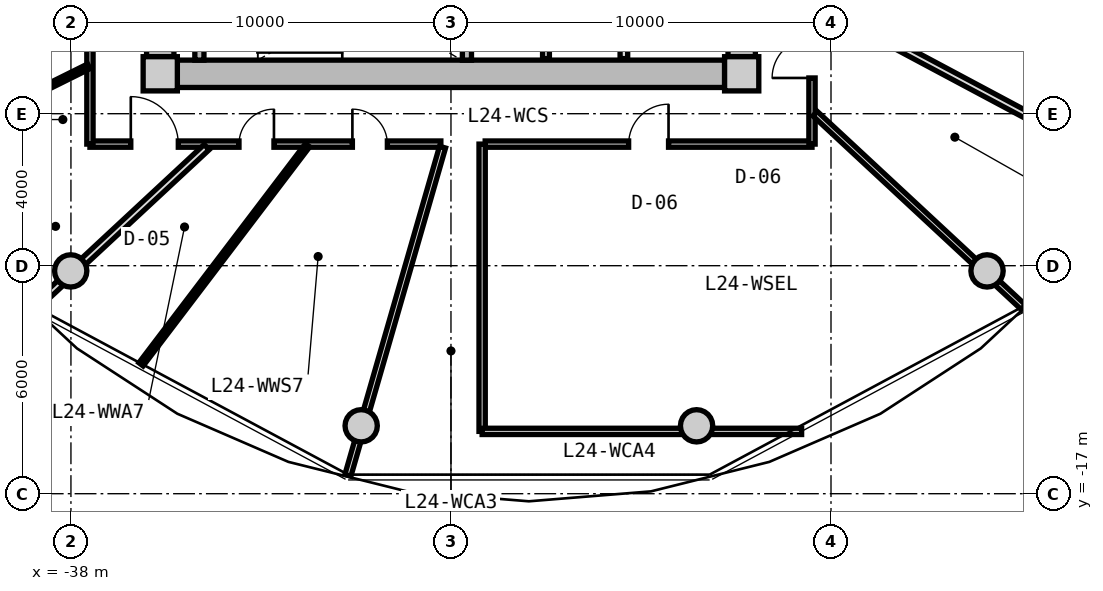
"""IFC4 building model, lengths in metres.
Left out: names, types, materials, properties, quantities, classifications, styles, units other than length and angle.
Written with IfcOpenShell. Run it as: python <this file> out.ifc"""

import sys

from ifc_helpers import new_model, si_unit, direction, frame, frame_2d, origin, origin_2d, place, context, subcontext, project, spatial, rectangle, circle, extrude, source, transform, mapped, element, fill, save


model = new_model("IFC4")
c1 = context("Model", 3, precision=1e-05, world=origin(), true_north=direction((0.0, 1.0)))
c2 = subcontext(c1, "Body", "Model", "MODEL_VIEW")
j1 = project(units=[si_unit("LENGTHUNIT", "METRE"), si_unit("PLANEANGLEUNIT", "RADIAN")], contexts=[c1])
p1 = place(None, origin())
s1 = spatial("IfcSite", under=j1, at=p1, CompositionType="ELEMENT")
p2 = place(p1, origin())
s2 = spatial("IfcBuilding", under=s1, at=p2, CompositionType="ELEMENT")
p3 = place(p2, frame((0.0, 0.0, 81.0)))
s3 = spatial("IfcBuildingStorey", under=s2, at=p3, CompositionType="ELEMENT", Elevation=81.0)
m1 = source(origin(), c2, "Body", "SweptSolid", [
    extrude(rectangle(XDim=0.9, YDim=0.9, at=origin_2d()), origin(), (0.0, 0.0, 1.0), 3.05),
])
for number, where, z_axis, x_axis in (
    (1, (-35.65, -5.95, 0.0), (0.0, 0.0, 1.0), (1.0, 0.0, 0.0)),
    (2, (-20.35, -5.95, 0.0), (0.0, 0.0, 1.0), (1.0, 0.0, 0.0)),
):
    element("IfcColumn", number, at=place(p3, frame(where, z_axis=z_axis, x_axis=x_axis)), inside=s3, PredefinedType="COLUMN", context=c2, shape_type="MappedRepresentation", body=[
        mapped(m1, transform((0.0, 0.0, 0.0), x_axis=(1.0, 0.0, 0.0), y_axis=(0.0, 1.0, 0.0), z_axis=(0.0, 0.0, 1.0), scale=1.0)),
    ])
m2 = source(origin(), c2, "Body", "SweptSolid", [
    extrude(rectangle(XDim=14.4, YDim=0.72, at=frame_2d((7.2, 0.0))), origin(), (0.0, 0.0, 1.0), 2.79),
])
p4 = place(p3, frame((-20.8, -5.95, 0.0), z_axis=(0.0, 0.0, 1.0), x_axis=(-1.0, 0.0, 0.0)))
e3 = element("IfcWall", 3, at=p4, inside=s3, PredefinedType="SHEAR", context=c2, shape_type="MappedRepresentation", body=[
    mapped(m2, transform((0.0, 0.0, 0.0), x_axis=(1.0, 0.0, 0.0), y_axis=(0.0, 1.0, 0.0), z_axis=(0.0, 0.0, 1.0), scale=1.0)),
])
m3 = source(origin(), c2, "Body", "SweptSolid", [
    extrude(rectangle(XDim=11.0, YDim=0.72, at=frame_2d((5.5, 0.0))), origin(), (0.0, 0.0, 1.0), 2.79),
])
p5 = place(p3, frame((-35.65, -5.5, 0.0), z_axis=(0.0, 0.0, 1.0), x_axis=(0.0, 1.0, 0.0)))
e4 = element("IfcWall", 4, at=p5, inside=s3, PredefinedType="SHEAR", context=c2, shape_type="MappedRepresentation", body=[
    mapped(m3, transform((0.0, 0.0, 0.0), x_axis=(1.0, 0.0, 0.0), y_axis=(0.0, 1.0, 0.0), z_axis=(0.0, 0.0, 1.0), scale=1.0)),
])
p6 = place(p5, frame((3.8, 0.0, 0.0)))
e5 = element("IfcOpeningElement", 5, at=p6, cuts=e4, PredefinedType="OPENING", context=c2, shape_type="SweptSolid", body=[
    extrude(rectangle(XDim=1.2, YDim=2.15, at=frame_2d((0.6, 1.075))), frame((0.0, 0.37, 0.0), z_axis=(0.0, -1.0, 0.0), x_axis=(1.0, 0.0, 0.0)), (0.0, 0.0, 1.0), 0.74),
])
p7 = place(p3, frame((-20.35, 5.5, 0.0), z_axis=(0.0, 0.0, 1.0), x_axis=(0.0, -1.0, 0.0)))
e6 = element("IfcWall", 6, at=p7, inside=s3, PredefinedType="SHEAR", context=c2, shape_type="MappedRepresentation", body=[
    mapped(m3, transform((0.0, 0.0, 0.0), x_axis=(1.0, 0.0, 0.0), y_axis=(0.0, 1.0, 0.0), z_axis=(0.0, 0.0, 1.0), scale=1.0)),
])
p8 = place(p7, frame((5.65, 0.0, 0.0)))
e7 = element("IfcOpeningElement", 7, at=p8, cuts=e6, PredefinedType="OPENING", context=c2, shape_type="SweptSolid", body=[
    extrude(rectangle(XDim=1.2, YDim=2.15, at=frame_2d((0.6, 1.075))), frame((0.0, 0.37, 0.0), z_axis=(0.0, -1.0, 0.0), x_axis=(1.0, 0.0, 0.0)), (0.0, 0.0, 1.0), 0.74),
])
m4 = source(origin(), c2, "Body", "SweptSolid", [
    extrude(circle(Radius=0.425, at=origin_2d()), origin(), (0.0, 0.0, 1.0), 3.05),
])
for number, where, z_axis, x_axis in (
    (8, (-38.006, -11.137, 0.0), (0.0, 0.0, 1.0), (1.0, 0.0, 0.0)),
    (9, (-30.363, -15.213, 0.0), (0.0, 0.0, 1.0), (1.0, 0.0, 0.0)),
    (10, (-21.537, -15.213, 0.0), (0.0, 0.0, 1.0), (1.0, 0.0, 0.0)),
    (11, (-13.894, -11.137, 0.0), (0.0, 0.0, 1.0), (1.0, 0.0, 0.0)),
):
    element("IfcColumn", number, at=place(p3, frame(where, z_axis=z_axis, x_axis=x_axis)), inside=s3, PredefinedType="COLUMN", context=c2, shape_type="MappedRepresentation", body=[
        mapped(m4, transform((0.0, 0.0, 0.0), x_axis=(1.0, 0.0, 0.0), y_axis=(0.0, 1.0, 0.0), z_axis=(0.0, 0.0, 1.0), scale=1.0)),
    ])
m5 = source(origin(), c2, "Body", "SweptSolid", [
    extrude(rectangle(XDim=3.14, YDim=0.24, at=frame_2d((1.57, 0.0))), origin(), (0.0, 0.0, 1.0), 2.79),
])
for number, where, z_axis, x_axis in (
    (12, (-34.62, -5.59, 0.0), (0.0, 0.0, 1.0), (0.0, 1.0, 0.0)),
    (13, (-27.58, -5.59, 0.0), (0.0, 0.0, 1.0), (0.0, 1.0, 0.0)),
):
    element("IfcWall", number, at=place(p3, frame(where, z_axis=z_axis, x_axis=x_axis)), inside=s3, PredefinedType="PARTITIONING", context=c2, shape_type="MappedRepresentation", body=[
        mapped(m5, transform((0.0, 0.0, 0.0), x_axis=(1.0, 0.0, 0.0), y_axis=(0.0, 1.0, 0.0), z_axis=(0.0, 0.0, 1.0), scale=1.0)),
    ])
m6 = source(origin(), c2, "Body", "SweptSolid", [
    extrude(rectangle(XDim=3.8, YDim=0.2, at=frame_2d((1.9, 0.0))), origin(), (0.0, 0.0, 1.0), 2.775),
])
p9 = place(p3, frame((-23.45, -5.55, 0.0), z_axis=(0.0, 0.0, 1.0), x_axis=(0.0, 1.0, 0.0)))
e14 = element("IfcWall", 14, at=p9, inside=s3, PredefinedType="PARTITIONING", context=c2, shape_type="MappedRepresentation", body=[
    mapped(m6, transform((0.0, 0.0, 0.0), x_axis=(1.0, 0.0, 0.0), y_axis=(0.0, 1.0, 0.0), z_axis=(0.0, 0.0, 1.0), scale=1.0)),
])
m7 = source(origin(), c2, "Body", "SweptSolid", [
    extrude(rectangle(XDim=3.22, YDim=0.18, at=frame_2d((1.61, 0.0))), origin(), (0.0, 0.0, 1.0), 2.775),
])
p10 = place(p3, frame((-25.5, -5.55, 0.0), z_axis=(0.0, 0.0, 1.0), x_axis=(0.0, 1.0, 0.0)))
e15 = element("IfcWall", 15, at=p10, inside=s3, PredefinedType="PARTITIONING", context=c2, shape_type="MappedRepresentation", body=[
    mapped(m7, transform((0.0, 0.0, 0.0), x_axis=(1.0, 0.0, 0.0), y_axis=(0.0, 1.0, 0.0), z_axis=(0.0, 0.0, 1.0), scale=1.0)),
])
m8 = source(origin(), c2, "Body", "SweptSolid", [
    extrude(rectangle(XDim=8.6, YDim=0.165, at=frame_2d((4.3, 0.0))), origin(), (0.0, 0.0, 1.0), 2.775),
])
p11 = place(p3, frame((-18.5, -7.8, 0.0), z_axis=(0.0, 0.0, 1.0), x_axis=(-1.0, 0.0, 0.0)))
e16 = element("IfcWall", 16, at=p11, inside=s3, PredefinedType="PARTITIONING", context=c2, shape_type="MappedRepresentation", body=[
    mapped(m8, transform((0.0, 0.0, 0.0), x_axis=(1.0, 0.0, 0.0), y_axis=(0.0, 1.0, 0.0), z_axis=(0.0, 0.0, 1.0), scale=1.0)),
])
p12 = place(p11, frame((3.775, 0.0, 0.0)))
e17 = element("IfcOpeningElement", 17, at=p12, cuts=e16, PredefinedType="OPENING", context=c2, shape_type="SweptSolid", body=[
    extrude(rectangle(XDim=1.05, YDim=2.15, at=frame_2d((0.525, 1.075))), frame((0.0, 0.093, 0.0), z_axis=(0.0, -1.0, 0.0), x_axis=(1.0, 0.0, 0.0)), (0.0, 0.0, 1.0), 0.185),
])
m9 = source(origin(), c2, "Body", "SweptSolid", [
    extrude(rectangle(XDim=9.234, YDim=0.165, at=frame_2d((4.617, 0.0))), origin(), (0.0, 0.0, 1.0), 2.775),
])
p13 = place(p3, frame((-28.266, -7.8, 0.0), z_axis=(0.0, 0.0, 1.0), x_axis=(-1.0, 0.0, 0.0)))
e18 = element("IfcWall", 18, at=p13, inside=s3, PredefinedType="PARTITIONING", context=c2, shape_type="MappedRepresentation", body=[
    mapped(m9, transform((0.0, 0.0, 0.0), x_axis=(1.0, 0.0, 0.0), y_axis=(0.0, 1.0, 0.0), z_axis=(0.0, 0.0, 1.0), scale=1.0)),
])
p14 = place(p13, frame((6.909, 0.0, 0.0)))
e19 = element("IfcOpeningElement", 19, at=p14, cuts=e18, PredefinedType="OPENING", context=c2, shape_type="SweptSolid", body=[
    extrude(rectangle(XDim=1.25, YDim=2.2, at=frame_2d((0.625, 1.1))), frame((0.0, 0.093, 0.0), z_axis=(0.0, -1.0, 0.0), x_axis=(1.0, 0.0, 0.0)), (0.0, 0.0, 1.0), 0.185),
])
p15 = place(p13, frame((4.392, 0.0, 0.0)))
e20 = element("IfcOpeningElement", 20, at=p15, cuts=e18, PredefinedType="OPENING", context=c2, shape_type="SweptSolid", body=[
    extrude(rectangle(XDim=0.92, YDim=2.1, at=frame_2d((0.46, 1.05))), frame((0.0, 0.093, 0.0), z_axis=(0.0, -1.0, 0.0), x_axis=(1.0, 0.0, 0.0)), (0.0, 0.0, 1.0), 0.185),
])
p16 = place(p13, frame((1.408, 0.0, 0.0)))
e21 = element("IfcOpeningElement", 21, at=p16, cuts=e18, PredefinedType="OPENING", context=c2, shape_type="SweptSolid", body=[
    extrude(rectangle(XDim=0.92, YDim=2.1, at=frame_2d((0.46, 1.05))), frame((0.0, 0.093, 0.0), z_axis=(0.0, -1.0, 0.0), x_axis=(1.0, 0.0, 0.0)), (0.0, 0.0, 1.0), 0.185),
])
m10 = source(origin(), c2, "Body", "SweptSolid", [
    extrude(rectangle(XDim=15.6, YDim=0.165, at=frame_2d((7.8, 0.0))), origin(), (0.0, 0.0, 1.0), 2.775),
])
p17 = place(p3, frame((-37.5, -7.8, 0.0), z_axis=(0.0, 0.0, 1.0), x_axis=(0.0, 1.0, 0.0)))
e22 = element("IfcWall", 22, at=p17, inside=s3, PredefinedType="PARTITIONING", context=c2, shape_type="MappedRepresentation", body=[
    mapped(m10, transform((0.0, 0.0, 0.0), x_axis=(1.0, 0.0, 0.0), y_axis=(0.0, 1.0, 0.0), z_axis=(0.0, 0.0, 1.0), scale=1.0)),
])
p18 = place(p17, frame((12.399, 0.0, 0.0)))
e23 = element("IfcOpeningElement", 23, at=p18, cuts=e22, PredefinedType="OPENING", context=c2, shape_type="SweptSolid", body=[
    extrude(rectangle(XDim=1.25, YDim=2.2, at=frame_2d((0.625, 1.1))), frame((0.0, 0.093, 0.0), z_axis=(0.0, -1.0, 0.0), x_axis=(1.0, 0.0, 0.0)), (0.0, 0.0, 1.0), 0.185),
])
p19 = place(p17, frame((7.175, 0.0, 0.0)))
e24 = element("IfcOpeningElement", 24, at=p19, cuts=e22, PredefinedType="OPENING", context=c2, shape_type="SweptSolid", body=[
    extrude(rectangle(XDim=1.25, YDim=2.2, at=frame_2d((0.625, 1.1))), frame((0.0, 0.093, 0.0), z_axis=(0.0, -1.0, 0.0), x_axis=(1.0, 0.0, 0.0)), (0.0, 0.0, 1.0), 0.185),
])
p20 = place(p3, frame((-18.5, 7.8, 0.0), z_axis=(0.0, 0.0, 1.0), x_axis=(0.0, -1.0, 0.0)))
e25 = element("IfcWall", 25, at=p20, inside=s3, PredefinedType="PARTITIONING", context=c2, shape_type="MappedRepresentation", body=[
    mapped(m10, transform((0.0, 0.0, 0.0), x_axis=(1.0, 0.0, 0.0), y_axis=(0.0, 1.0, 0.0), z_axis=(0.0, 0.0, 1.0), scale=1.0)),
])
p21 = place(p20, frame((12.81, 0.0, 0.0)))
e26 = element("IfcOpeningElement", 26, at=p21, cuts=e25, PredefinedType="OPENING", context=c2, shape_type="SweptSolid", body=[
    extrude(rectangle(XDim=1.05, YDim=2.15, at=frame_2d((0.525, 1.075))), frame((0.0, 0.093, 0.0), z_axis=(0.0, -1.0, 0.0), x_axis=(1.0, 0.0, 0.0)), (0.0, 0.0, 1.0), 0.185),
])
p22 = place(p20, frame((10.21, 0.0, 0.0)))
e27 = element("IfcOpeningElement", 27, at=p22, cuts=e25, PredefinedType="OPENING", context=c2, shape_type="SweptSolid", body=[
    extrude(rectangle(XDim=1.05, YDim=2.15, at=frame_2d((0.525, 1.075))), frame((0.0, 0.093, 0.0), z_axis=(0.0, -1.0, 0.0), x_axis=(1.0, 0.0, 0.0)), (0.0, 0.0, 1.0), 0.185),
])
p23 = place(p20, frame((4.575, 0.0, 0.0)))
e28 = element("IfcOpeningElement", 28, at=p23, cuts=e25, PredefinedType="OPENING", context=c2, shape_type="SweptSolid", body=[
    extrude(rectangle(XDim=1.25, YDim=2.2, at=frame_2d((0.625, 1.1))), frame((0.0, 0.093, 0.0), z_axis=(0.0, -1.0, 0.0), x_axis=(1.0, 0.0, 0.0)), (0.0, 0.0, 1.0), 0.185),
])
m11 = source(origin(), c2, "Body", "SweptSolid", [
    extrude(rectangle(XDim=8.989, YDim=0.165, at=frame_2d((4.495, 0.0))), origin(), (0.0, 0.0, 1.0), 2.275),
])
p24 = place(p3, frame((-28.222, -7.88, 0.0), z_axis=(0.0, 0.0, 1.0), x_axis=(-0.27702323008, -0.960863221274, 0.0)))
e29 = element("IfcWall", 29, at=p24, inside=s3, PredefinedType="PARTITIONING", context=c2, shape_type="MappedRepresentation", body=[
    mapped(m11, transform((0.0, 0.0, 0.0), x_axis=(1.0, 0.0, 0.0), y_axis=(0.0, 1.0, 0.0), z_axis=(0.0, 0.0, 1.0), scale=1.0)),
])
m12 = source(origin(), c2, "Body", "SweptSolid", [
    extrude(rectangle(XDim=7.482, YDim=0.165, at=frame_2d((3.741, 0.0))), origin(), (0.0, 0.0, 1.0), 2.275),
])
p25 = place(p3, frame((-18.42, -6.998, 0.0), z_axis=(0.0, 0.0, 1.0), x_axis=(0.732508698043, -0.680757671489, 0.0)))
e30 = element("IfcWall", 30, at=p25, inside=s3, PredefinedType="PARTITIONING", context=c2, shape_type="MappedRepresentation", body=[
    mapped(m12, transform((0.0, 0.0, 0.0), x_axis=(1.0, 0.0, 0.0), y_axis=(0.0, 1.0, 0.0), z_axis=(0.0, 0.0, 1.0), scale=1.0)),
])
m13 = source(origin(), c2, "Body", "SweptSolid", [
    extrude(rectangle(XDim=7.56, YDim=0.165, at=frame_2d((3.78, 0.0))), origin(), (0.0, 0.0, 1.0), 2.775),
])
p26 = place(p3, frame((-27.18, -15.36, 0.0), z_axis=(0.0, 0.0, 1.0), x_axis=(0.0, 1.0, 0.0)))
e31 = element("IfcWall", 31, at=p26, inside=s3, PredefinedType="PARTITIONING", context=c2, shape_type="MappedRepresentation", body=[
    mapped(m13, transform((0.0, 0.0, 0.0), x_axis=(1.0, 0.0, 0.0), y_axis=(0.0, 1.0, 0.0), z_axis=(0.0, 0.0, 1.0), scale=1.0)),
])
m14 = source(origin(), c2, "Body", "SweptSolid", [
    extrude(rectangle(XDim=8.407, YDim=0.165, at=frame_2d((4.204, 0.0))), origin(), (0.0, 0.0, 1.0), 2.275),
])
p27 = place(p3, frame((-27.18, -15.36, 0.0), z_axis=(0.0, 0.0, 1.0), x_axis=(1.0, 0.0, 0.0)))
e32 = element("IfcWall", 32, at=p27, inside=s3, PredefinedType="PARTITIONING", context=c2, shape_type="MappedRepresentation", body=[
    mapped(m14, transform((0.0, 0.0, 0.0), x_axis=(1.0, 0.0, 0.0), y_axis=(0.0, 1.0, 0.0), z_axis=(0.0, 0.0, 1.0), scale=1.0)),
])
m15 = source(origin(), c2, "Body", "SweptSolid", [
    extrude(rectangle(XDim=6.187, YDim=0.19, at=frame_2d((3.093, 0.0))), origin(), (0.0, 0.0, 1.0), 2.275),
])
p28 = place(p3, frame((-34.429, -7.88, 0.0), z_axis=(0.0, 0.0, 1.0), x_axis=(-0.732501077882, -0.680765870841, 0.0)))
e33 = element("IfcWall", 33, at=p28, inside=s3, PredefinedType="PARTITIONING", context=c2, shape_type="MappedRepresentation", body=[
    mapped(m15, transform((0.0, 0.0, 0.0), x_axis=(1.0, 0.0, 0.0), y_axis=(0.0, 1.0, 0.0), z_axis=(0.0, 0.0, 1.0), scale=1.0)),
])
m16 = source(origin(), c2, "Body", "SweptSolid", [
    extrude(rectangle(XDim=2.469, YDim=0.14, at=frame_2d((1.235, 0.0))), origin(), (0.0, 0.0, 1.0), 2.775),
])
p29 = place(p3, frame((-37.53, -5.754, 0.0), z_axis=(0.0, 0.0, 1.0), x_axis=(-0.895512172456, -0.445037019789, 0.0)))
e34 = element("IfcWall", 34, at=p29, inside=s3, PredefinedType="PARTITIONING", context=c2, shape_type="MappedRepresentation", body=[
    mapped(m16, transform((0.0, 0.0, 0.0), x_axis=(1.0, 0.0, 0.0), y_axis=(0.0, 1.0, 0.0), z_axis=(0.0, 0.0, 1.0), scale=1.0)),
])
m17 = source(origin(), c2, "Body", "SweptSolid", [
    extrude(rectangle(XDim=7.243, YDim=0.14, at=frame_2d((3.621, 0.0))), origin(), (0.0, 0.0, 1.0), 2.775),
])
p30 = place(p3, frame((-31.774, -7.83, 0.0), z_axis=(0.0, 0.0, 1.0), x_axis=(-0.605111472002, -0.796140757939, 0.0)))
e35 = element("IfcWall", 35, at=p30, inside=s3, PredefinedType="PARTITIONING", context=c2, shape_type="MappedRepresentation", body=[
    mapped(m17, transform((0.0, 0.0, 0.0), x_axis=(1.0, 0.0, 0.0), y_axis=(0.0, 1.0, 0.0), z_axis=(0.0, 0.0, 1.0), scale=1.0)),
])
m18 = source(origin(), c2, "Body", "SweptSolid", [
    extrude(rectangle(XDim=8.968, YDim=0.19, at=frame_2d((4.484, 0.0))), origin(), (0.0, 0.0, 1.0), 2.775),
])
p31 = place(p3, frame((-18.47, -4.036, 0.0), z_axis=(0.0, 0.0, 1.0), x_axis=(0.882202936563, -0.47086938605, 0.0)))
e36 = element("IfcWall", 36, at=p31, inside=s3, PredefinedType="PARTITIONING", context=c2, shape_type="MappedRepresentation", body=[
    mapped(m18, transform((0.0, 0.0, 0.0), x_axis=(1.0, 0.0, 0.0), y_axis=(0.0, 1.0, 0.0), z_axis=(0.0, 0.0, 1.0), scale=1.0)),
])
m19 = source(origin(), c2, "Body", "SweptSolid", [
    extrude(rectangle(XDim=1.05, YDim=2.15, at=frame_2d((0.525, 1.075))), frame((0.0, 0.025, 0.0), z_axis=(0.0, -1.0, 0.0), x_axis=(1.0, 0.0, 0.0)), (0.0, 0.0, 1.0), 0.05),
])
p32 = place(p12, frame((1.05, 0.0, 0.0), z_axis=(0.0, 0.0, 1.0), x_axis=(-1.0, 0.0, 0.0)))
e37 = element("IfcDoor", 37, at=p32, inside=s3, OperationType="SINGLE_SWING_RIGHT", PredefinedType="DOOR", context=c2, shape_type="MappedRepresentation", body=[
    mapped(m19, transform((0.0, 0.0, 0.0), x_axis=(1.0, 0.0, 0.0), y_axis=(0.0, 1.0, 0.0), z_axis=(0.0, 0.0, 1.0), scale=1.0)),
])
fill(e17, e37)
m20 = source(origin(), c2, "Body", "SweptSolid", [
    extrude(rectangle(XDim=1.25, YDim=2.2, at=frame_2d((0.625, 1.1))), frame((0.0, 0.025, 0.0), z_axis=(0.0, -1.0, 0.0), x_axis=(1.0, 0.0, 0.0)), (0.0, 0.0, 1.0), 0.05),
])
p33 = place(p14, frame((1.25, 0.0, 0.0), z_axis=(0.0, 0.0, 1.0), x_axis=(-1.0, 0.0, 0.0)))
e38 = element("IfcDoor", 38, at=p33, inside=s3, OperationType="SINGLE_SWING_LEFT", PredefinedType="DOOR", context=c2, shape_type="MappedRepresentation", body=[
    mapped(m20, transform((0.0, 0.0, 0.0), x_axis=(1.0, 0.0, 0.0), y_axis=(0.0, 1.0, 0.0), z_axis=(0.0, 0.0, 1.0), scale=1.0)),
])
fill(e19, e38)
m21 = source(origin(), c2, "Body", "SweptSolid", [
    extrude(rectangle(XDim=0.92, YDim=2.1, at=frame_2d((0.46, 1.05))), frame((0.0, 0.025, 0.0), z_axis=(0.0, -1.0, 0.0), x_axis=(1.0, 0.0, 0.0)), (0.0, 0.0, 1.0), 0.05),
])
p34 = place(p15, frame((0.92, 0.0, 0.0), z_axis=(0.0, 0.0, 1.0), x_axis=(-1.0, 0.0, 0.0)))
e39 = element("IfcDoor", 39, at=p34, inside=s3, OperationType="SINGLE_SWING_RIGHT", PredefinedType="DOOR", context=c2, shape_type="MappedRepresentation", body=[
    mapped(m21, transform((0.0, 0.0, 0.0), x_axis=(1.0, 0.0, 0.0), y_axis=(0.0, 1.0, 0.0), z_axis=(0.0, 0.0, 1.0), scale=1.0)),
])
fill(e20, e39)
p35 = place(p16, frame((0.92, 0.0, 0.0), z_axis=(0.0, 0.0, 1.0), x_axis=(-1.0, 0.0, 0.0)))
e40 = element("IfcDoor", 40, at=p35, inside=s3, OperationType="SINGLE_SWING_LEFT", PredefinedType="DOOR", context=c2, shape_type="MappedRepresentation", body=[
    mapped(m21, transform((0.0, 0.0, 0.0), x_axis=(1.0, 0.0, 0.0), y_axis=(0.0, 1.0, 0.0), z_axis=(0.0, 0.0, 1.0), scale=1.0)),
])
fill(e21, e40)
p36 = place(p21, frame((1.05, 0.0, 0.0), z_axis=(0.0, 0.0, 1.0), x_axis=(-1.0, 0.0, 0.0)))
e41 = element("IfcDoor", 41, at=p36, inside=s3, OperationType="SINGLE_SWING_LEFT", PredefinedType="DOOR", context=c2, shape_type="MappedRepresentation", body=[
    mapped(m19, transform((0.0, 0.0, 0.0), x_axis=(1.0, 0.0, 0.0), y_axis=(0.0, 1.0, 0.0), z_axis=(0.0, 0.0, 1.0), scale=1.0)),
])
fill(e26, e41)
save(model, sys.argv[1])
